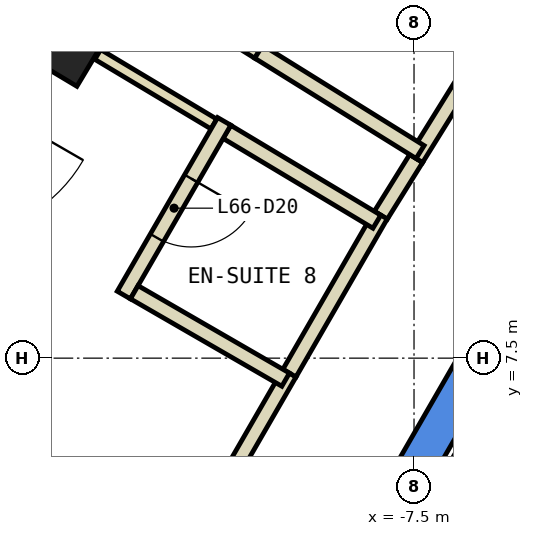
"""IFC4 building model, lengths in metres.
Left out: names, types, materials, properties, quantities, classifications, styles, units other than length and angle.
Written with IfcOpenShell. Run it as: python <this file> out.ifc"""

import sys

from ifc_helpers import new_model, si_unit, direction, frame, frame_2d, origin, origin_2d, place, context, subcontext, project, spatial, polyline, rectangle, outline, extrude, element, fill, save


model = new_model("IFC4")
c1 = context("Model", 3, precision=1e-05, world=origin(), true_north=direction((0.0, 1.0)))
c2 = subcontext(c1, "Body", "Model", "MODEL_VIEW")
j1 = project(units=[si_unit("LENGTHUNIT", "METRE"), si_unit("PLANEANGLEUNIT", "RADIAN")], contexts=[c1])
p1 = place(None, origin())
s1 = spatial("IfcSite", under=j1, at=p1, CompositionType="ELEMENT")
p2 = place(p1, origin())
s2 = spatial("IfcBuilding", under=s1, at=p2, CompositionType="ELEMENT")
p3 = place(p2, frame((0.0, 0.0, 286.4)))
s3 = spatial("IfcBuildingStorey", under=s2, at=p3, CompositionType="ELEMENT", Elevation=286.4)
p4 = place(p3, frame((-12.279, 11.865, 0.0), z_axis=(0.0, 0.0, 1.0), x_axis=(0.513945548584, 0.857822809845, 0.0)))
e1 = element("IfcColumn", 1, at=p4, inside=s3, PredefinedType="COLUMN", context=c2, shape_type="SweptSolid", body=[
    extrude(rectangle(XDim=1.0, YDim=1.4, at=origin_2d()), origin(), (0.0, 0.0, 1.0), 3.26),
])
p5 = place(p3, frame((0.0, 0.0, -0.6)))
e2 = element("IfcWall", 2, at=p5, inside=s3, PredefinedType="SHEAR", context=c2, shape_type="SweptSolid", body=[
    extrude(outline(polyline([(-9.236, 3.502), (-8.803, 3.253), (-4.619, 10.5), (-4.907, 11.0), (-9.236, 3.502)])), origin(), (0.0, 0.0, 1.0), 3.86),
])
p6 = place(p3, frame((-7.937, 9.38, 0.0), z_axis=(0.0, 0.0, 1.0), x_axis=(0.52850186976, 0.848932137252, 0.0)))
e3 = element("IfcWall", 3, at=p6, inside=s3, PredefinedType="PARTITIONING", context=c2, shape_type="SweptSolid", body=[
    extrude(rectangle(XDim=0.88, YDim=0.2, at=frame_2d((0.44, 0.0))), origin(), (0.0, 0.0, 1.0), 3.26),
])
p7 = place(p3, frame((-7.472, 10.127, 0.0), z_axis=(0.0, 0.0, 1.0), x_axis=(0.527707224705, 0.849426326996, 0.0)))
e4 = element("IfcWall", 4, at=p7, inside=s3, PredefinedType="PARTITIONING", context=c2, shape_type="SweptSolid", body=[
    extrude(rectangle(XDim=3.0, YDim=0.2, at=frame_2d((1.5, 0.0))), origin(), (0.0, 0.0, 1.0), 3.26),
])
p8 = place(p3, frame((-12.082, 2.207, 0.0), z_axis=(0.0, 0.0, 1.0), x_axis=(0.500123454404, 0.865954115618, 0.0)))
e5 = element("IfcWall", 5, at=p8, inside=s3, PredefinedType="PARTITIONING", context=c2, shape_type="SweptSolid", body=[
    extrude(rectangle(XDim=5.885, YDim=0.2, at=frame_2d((2.942, 0.0))), origin(), (0.0, 0.0, 1.0), 3.26),
])
p9 = place(p8, frame((2.493, 0.0, 0.0)))
e6 = element("IfcOpeningElement", 6, at=p9, cuts=e5, PredefinedType="OPENING", context=c2, shape_type="SweptSolid", body=[
    extrude(rectangle(XDim=1.0, YDim=2.1, at=frame_2d((0.5, 1.05))), frame((0.0, 0.11, 0.0), z_axis=(0.0, -1.0, 0.0), x_axis=(1.0, 0.0, 0.0)), (0.0, 0.0, 1.0), 0.22),
])
p10 = place(p3, frame((-9.139, 7.303, 0.0), z_axis=(0.0, 0.0, 1.0), x_axis=(0.499869187296, 0.866100915363, 0.0)))
e7 = element("IfcWall", 7, at=p10, inside=s3, PredefinedType="PARTITIONING", context=c2, shape_type="SweptSolid", body=[
    extrude(rectangle(XDim=2.401, YDim=0.2, at=frame_2d((1.2, 0.0))), origin(), (0.0, 0.0, 1.0), 3.26),
])
p11 = place(p3, frame((-7.992, 14.217, 0.0), z_axis=(0.0, 0.0, 1.0), x_axis=(-0.527795797674, -0.849371294522, 0.0)))
e8 = element("IfcWall", 8, at=p11, inside=s3, PredefinedType="PARTITIONING", context=c2, shape_type="SweptSolid", body=[
    extrude(rectangle(XDim=3.2, YDim=0.2, at=frame_2d((1.6, 0.0))), origin(), (0.0, 0.0, 1.0), 3.26),
])
p12 = place(p11, frame((1.15, 0.0, 0.0)))
e9 = element("IfcOpeningElement", 9, at=p12, cuts=e8, PredefinedType="OPENING", context=c2, shape_type="SweptSolid", body=[
    extrude(rectangle(XDim=0.9, YDim=2.1, at=frame_2d((0.45, 1.05))), frame((0.0, 0.11, 0.0), z_axis=(0.0, -1.0, 0.0), x_axis=(1.0, 0.0, 0.0)), (0.0, 0.0, 1.0), 0.22),
])
p13 = place(p3, frame((-9.543, 11.531, 0.0), z_axis=(0.0, 0.0, 1.0), x_axis=(0.849400119549, -0.527749407305, 0.0)))
e10 = element("IfcWall", 10, at=p13, inside=s3, PredefinedType="PARTITIONING", context=c2, shape_type="SweptSolid", body=[
    extrude(rectangle(XDim=2.5, YDim=0.2, at=frame_2d((1.25, 0.0))), origin(), (0.0, 0.0, 1.0), 3.26),
])
p14 = place(p3, frame((-10.133, 10.58, 0.0), z_axis=(0.0, 0.0, 1.0), x_axis=(-0.857903919212, 0.513810145287, 0.0)))
e11 = element("IfcWall", 11, at=p14, inside=s3, PredefinedType="PARTITIONING", context=c2, shape_type="SweptSolid", body=[
    extrude(rectangle(XDim=1.781, YDim=0.15, at=frame_2d((0.891, 0.0))), origin(), (0.0, 0.0, 1.0), 3.26),
])
p15 = place(p3, frame((-7.989, 9.295, 0.0), z_axis=(0.0, 0.0, 1.0), x_axis=(-0.857801856135, 0.513980520654, 0.0)))
e12 = element("IfcWall", 12, at=p15, inside=s3, PredefinedType="PARTITIONING", context=c2, shape_type="SweptSolid", body=[
    extrude(rectangle(XDim=2.3, YDim=0.2, at=frame_2d((1.15, 0.0))), origin(), (0.0, 0.0, 1.0), 3.26),
])
p16 = place(p3, frame((-9.997, 10.615, 0.0), z_axis=(0.0, 0.0, 1.0), x_axis=(-0.500525697837, -0.865721679182, 0.0)))
e13 = element("IfcWall", 13, at=p16, inside=s3, PredefinedType="PARTITIONING", context=c2, shape_type="SweptSolid", body=[
    extrude(rectangle(XDim=2.639, YDim=0.2, at=frame_2d((1.32, 0.0))), origin(), (0.0, 0.0, 1.0), 3.26),
])
p17 = place(p16, frame((0.869, 0.0, 0.0)))
e14 = element("IfcOpeningElement", 14, at=p17, cuts=e13, PredefinedType="OPENING", context=c2, shape_type="SweptSolid", body=[
    extrude(rectangle(XDim=0.9, YDim=2.1, at=frame_2d((0.45, 1.05))), frame((0.0, 0.11, 0.0), z_axis=(0.0, -1.0, 0.0), x_axis=(1.0, 0.0, 0.0)), (0.0, 0.0, 1.0), 0.22),
])
p18 = place(p3, frame((-11.181, 8.367, 0.0), z_axis=(0.0, 0.0, 1.0), x_axis=(0.866053019151, -0.499952165731, 0.0)))
e15 = element("IfcWall", 15, at=p18, inside=s3, PredefinedType="PARTITIONING", context=c2, shape_type="SweptSolid", body=[
    extrude(rectangle(XDim=2.3, YDim=0.2, at=frame_2d((1.15, 0.0))), origin(), (0.0, 0.0, 1.0), 3.26),
])
p19 = place(p3, frame((-5.03, 9.388, 0.0), z_axis=(0.0, 0.0, 1.0), x_axis=(-0.499978703459, -0.866037698999, 0.0)))
e16 = element("IfcWall", 16, at=p19, inside=s3, PredefinedType="STANDARD", context=c2, shape_type="SweptSolid", body=[
    extrude(rectangle(XDim=6.9, YDim=0.2, at=frame_2d((3.45, 0.0))), origin(), (0.0, 0.0, 1.0), 3.26),
])
p20 = place(p17, origin())
e17 = element("IfcDoor", 17, at=p20, inside=s3, OperationType="SINGLE_SWING_LEFT", PredefinedType="DOOR", context=c2, shape_type="SweptSolid", body=[
    extrude(rectangle(XDim=0.9, YDim=2.1, at=frame_2d((0.45, 1.05))), frame((0.0, 0.025, 0.0), z_axis=(0.0, -1.0, 0.0), x_axis=(1.0, 0.0, 0.0)), (0.0, 0.0, 1.0), 0.05),
])
fill(e14, e17)
save(model, sys.argv[1])
